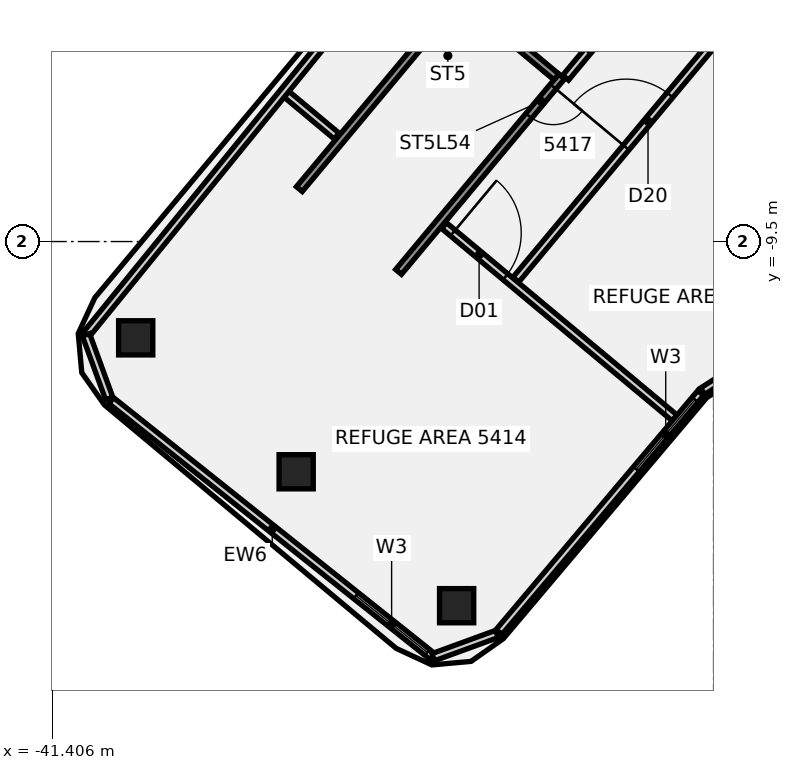
"""IFC4 building model, lengths in metres.
Left out: names, types, materials, properties, quantities, classifications, styles, units other than length and angle.
Written with IfcOpenShell. Run it as: python <this file> out.ifc"""

import sys

from ifc_helpers import new_model, si_unit, direction, frame, frame_2d, origin, origin_2d, place, context, subcontext, project, spatial, polyline, rectangle, outline, extrude, element, fill, save


model = new_model("IFC4")
c1 = context("Model", 3, precision=1e-05, world=origin(), true_north=direction((0.0, 1.0)))
c2 = subcontext(c1, "Body", "Model", "MODEL_VIEW")
j1 = project(units=[si_unit("LENGTHUNIT", "METRE"), si_unit("PLANEANGLEUNIT", "RADIAN")], contexts=[c1])
p1 = place(None, origin())
s1 = spatial("IfcSite", under=j1, at=p1, CompositionType="ELEMENT")
p2 = place(p1, origin())
s2 = spatial("IfcBuilding", under=s1, at=p2, CompositionType="ELEMENT")
p3 = place(p2, frame((0.0, 0.0, 214.9)))
s3 = spatial("IfcBuildingStorey", under=s2, at=p3, CompositionType="ELEMENT", Elevation=214.9)
p4 = place(p3, frame((-39.206, -12.033, -0.162), z_axis=(0.115134496444, 0.027306920099, 0.992974511175), x_axis=(-0.763693023334, 0.641674118337, 0.070903398837)))
e1 = element("IfcColumn", 1, at=p4, inside=s3, PredefinedType="COLUMN", context=c2, shape_type="SweptSolid", body=[
    extrude(rectangle(XDim=0.9, YDim=0.9, at=origin_2d()), origin(), (0.0, 0.0, 1.0), 5.042),
])
p5 = place(p3, frame((-34.983, -15.557, -0.164), z_axis=(0.127416086189, 0.042488122715, 0.990938898423), x_axis=(-0.763161584743, 0.642340953018, 0.070586795141)))
e2 = element("IfcColumn", 2, at=p5, inside=s3, PredefinedType="COLUMN", context=c2, shape_type="SweptSolid", body=[
    extrude(rectangle(XDim=0.9, YDim=0.9, at=origin_2d()), origin(), (0.0, 0.0, 1.0), 5.057),
])
p6 = place(p3, frame((-30.761, -19.082, -0.166), z_axis=(0.13956922481, 0.057608400723, 0.988535130206), x_axis=(-0.76278629276, 0.642825150018, 0.070234593205)))
e3 = element("IfcColumn", 3, at=p6, inside=s3, PredefinedType="COLUMN", context=c2, shape_type="SweptSolid", body=[
    extrude(rectangle(XDim=0.9, YDim=0.9, at=origin_2d()), origin(), (0.0, 0.0, 1.0), 5.073),
])
p7 = place(p3, frame((-35.345, -5.535, 0.0), z_axis=(0.0, 0.0, 1.0), x_axis=(0.767995139873, -0.640455669919, 0.0)))
e4 = element("IfcWall", 4, at=p7, inside=s3, PredefinedType="PARTITIONING", context=c2, shape_type="SweptSolid", body=[
    extrude(rectangle(XDim=1.859, YDim=0.2, at=frame_2d((0.929, 0.0))), origin(), (0.0, 0.0, 1.0), 4.16),
])
p8 = place(p3, frame((-31.091, -9.082, 0.0), z_axis=(0.0, 0.0, 1.0), x_axis=(0.768028712012, -0.640415410125, 0.0)))
e5 = element("IfcWall", 5, at=p8, inside=s3, PredefinedType="PARTITIONING", context=c2, shape_type="SweptSolid", body=[
    extrude(rectangle(XDim=7.899, YDim=0.2, at=frame_2d((3.95, 0.0))), origin(), (0.0, 0.0, 1.0), 4.16),
])
p9 = place(p8, frame((0.3, 0.0, 0.0)))
e6 = element("IfcOpeningElement", 6, at=p9, cuts=e5, PredefinedType="OPENING", context=c2, shape_type="SweptSolid", body=[
    extrude(rectangle(XDim=1.8, YDim=2.1, at=frame_2d((0.9, 1.05))), frame((0.0, 0.11, 0.0), z_axis=(0.0, -1.0, 0.0), x_axis=(1.0, 0.0, 0.0)), (0.0, 0.0, 1.0), 0.22),
])
p10 = place(p3, frame((-29.204, -10.504, 0.0), z_axis=(0.0, 0.0, 1.0), x_axis=(0.640742157365, 0.767756138221, 0.0)))
e7 = element("IfcWall", 7, at=p10, inside=s3, PredefinedType="PARTITIONING", context=c2, shape_type="SweptSolid", body=[
    extrude(rectangle(XDim=8.781, YDim=0.2, at=frame_2d((4.39, 0.0))), origin(), (0.0, 0.0, 1.0), 4.16),
])
p11 = place(p10, frame((4.53, 0.0, 0.0)))
e8 = element("IfcOpeningElement", 8, at=p11, cuts=e7, PredefinedType="OPENING", context=c2, shape_type="SweptSolid", body=[
    extrude(rectangle(XDim=1.8, YDim=2.1, at=frame_2d((0.9, 1.05))), frame((0.0, 0.11, 0.0), z_axis=(0.0, -1.0, 0.0), x_axis=(1.0, 0.0, 0.0)), (0.0, 0.0, 1.0), 0.22),
])
p12 = place(p3, frame((-27.894, -5.188, 0.0), z_axis=(0.0, 0.0, 1.0), x_axis=(0.640750333898, 0.767749314301, 0.0)))
e9 = element("IfcWall", 9, at=p12, inside=s3, PredefinedType="PARTITIONING", context=c2, shape_type="SweptSolid", body=[
    extrude(rectangle(XDim=3.86, YDim=0.2, at=frame_2d((1.93, 0.0))), origin(), (0.0, 0.0, 1.0), 4.16),
])
p13 = place(p12, frame((0.9, 0.0, 0.0)))
e10 = element("IfcOpeningElement", 10, at=p13, cuts=e9, PredefinedType="OPENING", context=c2, shape_type="SweptSolid", body=[
    extrude(rectangle(XDim=1.4, YDim=2.1, at=frame_2d((0.7, 1.05))), frame((0.0, 0.11, 0.0), z_axis=(0.0, -1.0, 0.0), x_axis=(1.0, 0.0, 0.0)), (0.0, 0.0, 1.0), 0.22),
])
p14 = place(p3, frame((-39.85, -13.687, 0.0), z_axis=(0.0, 0.0, 1.0), x_axis=(0.78216217296, -0.623074903355, 0.0)))
e11 = element("IfcWall", 11, at=p14, inside=s3, PredefinedType="SOLIDWALL", context=c2, shape_type="SweptSolid", body=[
    extrude(rectangle(XDim=10.833, YDim=0.2, at=frame_2d((5.417, 0.0))), origin(), (0.0, 0.0, 1.0), 4.86),
])
p15 = place(p14, frame((8.233, 0.0, 1.4)))
e12 = element("IfcOpeningElement", 12, at=p15, cuts=e11, PredefinedType="OPENING", context=c2, shape_type="SweptSolid", body=[
    extrude(rectangle(XDim=2.4, YDim=2.1, at=frame_2d((1.2, 1.05))), frame((0.0, 0.11, 0.0), z_axis=(0.0, -1.0, 0.0), x_axis=(1.0, 0.0, 0.0)), (0.0, 0.0, 1.0), 0.22),
])
p16 = place(p3, frame((-31.376, -20.436, 0.0), z_axis=(0.0, 0.0, 1.0), x_axis=(0.939396565925, 0.342832454601, 0.0)))
e13 = element("IfcWall", 13, at=p16, inside=s3, PredefinedType="SOLIDWALL", context=c2, shape_type="SweptSolid", body=[
    extrude(rectangle(XDim=1.781, YDim=0.2, at=frame_2d((0.891, 0.0))), origin(), (0.0, 0.0, 1.0), 4.86),
])
p17 = place(p3, frame((-29.645, -19.772, 0.0), z_axis=(0.0, 0.0, 1.0), x_axis=(0.64498793917, 0.764192749459, 0.0)))
e14 = element("IfcWall", 14, at=p17, inside=s3, PredefinedType="SOLIDWALL", context=c2, shape_type="SweptSolid", body=[
    extrude(rectangle(XDim=8.227, YDim=0.2, at=frame_2d((4.114, 0.0))), origin(), (0.0, 0.0, 1.0), 4.86),
])
p18 = place(p17, frame((5.6, 0.0, 1.4)))
e15 = element("IfcOpeningElement", 15, at=p18, cuts=e14, PredefinedType="OPENING", context=c2, shape_type="SweptSolid", body=[
    extrude(rectangle(XDim=2.4, YDim=2.1, at=frame_2d((1.2, 1.05))), frame((0.0, 0.11, 0.0), z_axis=(0.0, -1.0, 0.0), x_axis=(1.0, 0.0, 0.0)), (0.0, 0.0, 1.0), 0.22),
])
p19 = place(p3, frame((-24.287, -13.438, 0.0), z_axis=(0.0, 0.0, 1.0), x_axis=(0.841444816205, 0.540343058881, 0.0)))
e16 = element("IfcWall", 16, at=p19, inside=s3, PredefinedType="SOLIDWALL", context=c2, shape_type="SweptSolid", body=[
    extrude(rectangle(XDim=1.369, YDim=0.2, at=frame_2d((0.685, 0.0))), origin(), (0.0, 0.0, 1.0), 4.86),
])
p20 = place(p3, frame((-28.081, 3.326, 0.0), z_axis=(0.0, 0.0, 1.0), x_axis=(-0.631092649572, -0.775707462679, 0.0)))
e17 = element("IfcWall", 17, at=p20, inside=s3, PredefinedType="SOLIDWALL", context=c2, shape_type="SweptSolid", body=[
    extrude(rectangle(XDim=19.7, YDim=0.2, at=frame_2d((9.85, 0.0))), origin(), (0.0, 0.0, 1.0), 4.86),
])
p21 = place(p3, frame((-40.514, -11.955, 0.0), z_axis=(0.0, 0.0, 1.0), x_axis=(0.342755619945, -0.939424603146, 0.0)))
e18 = element("IfcWall", 18, at=p21, inside=s3, PredefinedType="SOLIDWALL", context=c2, shape_type="SweptSolid", body=[
    extrude(rectangle(XDim=1.781, YDim=0.2, at=frame_2d((0.89, 0.0))), origin(), (0.0, 0.0, 1.0), 4.86),
])
p22 = place(p3, frame((-27.996, -5.155, -0.18), z_axis=(0.0, 0.0, 1.0), x_axis=(-0.640775593129, -0.767728232678, 0.0)))
e19 = element("IfcWall", 19, at=p22, inside=s3, PredefinedType="SHEAR", context=c2, shape_type="SweptSolid", body=[
    extrude(rectangle(XDim=6.7, YDim=0.2, at=frame_2d((3.35, 0.0))), origin(), (0.0, 0.0, 1.0), 4.444),
])
p23 = place(p22, frame((0.35, 0.0, 0.0)))
e20 = element("IfcOpeningElement", 20, at=p23, cuts=e19, PredefinedType="OPENING", context=c2, shape_type="SweptSolid", body=[
    extrude(rectangle(XDim=1.0, YDim=2.1, at=frame_2d((0.5, 1.05))), frame((0.0, 0.11, 0.0), z_axis=(0.0, -1.0, 0.0), x_axis=(1.0, 0.0, 0.0)), (0.0, 0.0, 1.0), 0.22),
])
p24 = place(p3, frame((-30.606, -2.977, -0.18), z_axis=(0.0, 0.0, 1.0), x_axis=(-0.640775593129, -0.767728232678, 0.0)))
e21 = element("IfcWall", 21, at=p24, inside=s3, PredefinedType="SHEAR", context=c2, shape_type="SweptSolid", body=[
    extrude(rectangle(XDim=6.7, YDim=0.2, at=frame_2d((3.35, 0.0))), origin(), (0.0, 0.0, 1.0), 4.444),
])
p25 = place(p3, frame((-30.594, -3.117, -0.18), z_axis=(0.0, 0.0, 1.0), x_axis=(0.767727028485, -0.640777035898, 0.0)))
e22 = element("IfcWall", 22, at=p25, inside=s3, PredefinedType="SHEAR", context=c2, shape_type="SweptSolid", body=[
    extrude(rectangle(XDim=3.2, YDim=0.2, at=frame_2d((1.6, 0.0))), origin(), (0.0, 0.0, 1.0), 4.444),
])
p26 = place(p3, frame((0.0, 0.0, -0.18)))
e23 = element("IfcWall", 23, at=p26, inside=s3, PredefinedType="SHEAR", context=c2, shape_type="SweptSolid", body=[
    extrude(outline(polyline([(-34.695, -8.031), (-34.823, -8.185), (-32.366, -10.235), (-32.238, -10.081), (-34.695, -8.031)])), origin(), (0.0, 0.0, 1.0), 4.444),
])
p27 = place(p9, frame((1.8, 0.0, 0.0), z_axis=(0.0, 0.0, 1.0), x_axis=(-1.0, 0.0, 0.0)))
e24 = element("IfcDoor", 24, at=p27, inside=s3, OperationType="DOUBLE_DOOR_SINGLE_SWING", PredefinedType="DOOR", context=c2, shape_type="SweptSolid", body=[
    extrude(rectangle(XDim=1.8, YDim=2.1, at=frame_2d((0.9, 1.05))), frame((0.0, 0.025, 0.0), z_axis=(0.0, -1.0, 0.0), x_axis=(1.0, 0.0, 0.0)), (0.0, 0.0, 1.0), 0.05),
])
fill(e6, e24)
p28 = place(p11, frame((1.8, 0.0, 0.0), z_axis=(0.0, 0.0, 1.0), x_axis=(-1.0, 0.0, 0.0)))
e25 = element("IfcDoor", 25, at=p28, inside=s3, OperationType="DOUBLE_DOOR_SINGLE_SWING", PredefinedType="DOOR", context=c2, shape_type="SweptSolid", body=[
    extrude(rectangle(XDim=1.8, YDim=2.1, at=frame_2d((0.9, 1.05))), frame((0.0, 0.025, 0.0), z_axis=(0.0, -1.0, 0.0), x_axis=(1.0, 0.0, 0.0)), (0.0, 0.0, 1.0), 0.05),
])
fill(e8, e25)
p29 = place(p15, origin())
e26 = element("IfcWindow", 26, at=p29, inside=s3, PartitioningType="SINGLE_PANEL", PredefinedType="WINDOW", context=c2, shape_type="SweptSolid", body=[
    extrude(rectangle(XDim=2.4, YDim=2.1, at=frame_2d((1.2, 1.05))), frame((0.0, 0.03, 0.0), z_axis=(0.0, -1.0, 0.0), x_axis=(1.0, 0.0, 0.0)), (0.0, 0.0, 1.0), 0.06),
])
fill(e12, e26)
p30 = place(p18, origin())
e27 = element("IfcWindow", 27, at=p30, inside=s3, PartitioningType="SINGLE_PANEL", PredefinedType="WINDOW", context=c2, shape_type="SweptSolid", body=[
    extrude(rectangle(XDim=2.4, YDim=2.1, at=frame_2d((1.2, 1.05))), frame((0.0, 0.03, 0.0), z_axis=(0.0, -1.0, 0.0), x_axis=(1.0, 0.0, 0.0)), (0.0, 0.0, 1.0), 0.06),
])
fill(e15, e27)
p31 = place(p23, origin())
e28 = element("IfcDoor", 28, at=p31, inside=s3, OperationType="SINGLE_SWING_LEFT", PredefinedType="DOOR", context=c2, shape_type="SweptSolid", body=[
    extrude(rectangle(XDim=1.0, YDim=2.1, at=frame_2d((0.5, 1.05))), frame((0.0, 0.025, 0.0), z_axis=(0.0, -1.0, 0.0), x_axis=(1.0, 0.0, 0.0)), (0.0, 0.0, 1.0), 0.05),
])
fill(e20, e28)
save(model, sys.argv[1])
